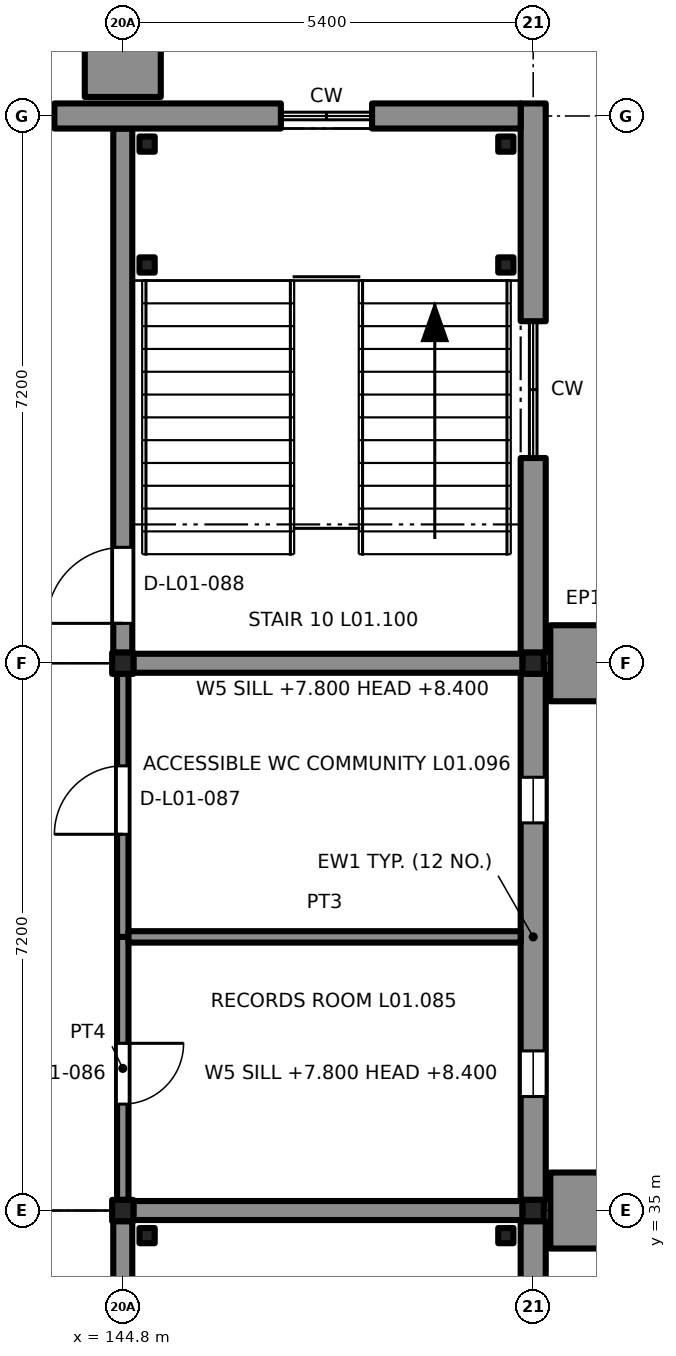
"""IFC4 building model, lengths in metres.
Left out: names, types, materials, properties, quantities, classifications, styles, units other than length and angle.
Written with IfcOpenShell. Run it as: python <this file> out.ifc"""

import sys

from ifc_helpers import new_model, si_unit, direction, frame, frame_2d, origin, origin_2d, place, context, subcontext, project, spatial, rectangle, extrude, element, fill, save


model = new_model("IFC4")
c1 = context("Model", 3, precision=1e-05, world=origin(), true_north=direction((0.0, 1.0)))
c2 = subcontext(c1, "Body", "Model", "MODEL_VIEW")
j1 = project(units=[si_unit("LENGTHUNIT", "METRE"), si_unit("PLANEANGLEUNIT", "RADIAN")], contexts=[c1])
p1 = place(None, origin())
s1 = spatial("IfcSite", under=j1, at=p1, CompositionType="ELEMENT")
p2 = place(p1, origin())
s2 = spatial("IfcBuilding", under=s1, at=p2, CompositionType="ELEMENT")
p3 = place(p2, frame((0.0, 0.0, 6.3)))
s3 = spatial("IfcBuildingStorey", under=s2, at=p3, CompositionType="ELEMENT", Elevation=6.3)
for number, where, z_axis, x_axis in (
    (1, (144.8, 35.0, 0.0), (0.0, 0.0, 1.0), (1.0, 0.0, 0.0)),
    (2, (150.2, 35.0, 0.0), (0.0, 0.0, 1.0), (1.0, 0.0, 0.0)),
    (3, (144.8, 42.2, 0.0), (0.0, 0.0, 1.0), (1.0, 0.0, 0.0)),
    (4, (150.2, 42.2, 0.0), (0.0, 0.0, 1.0), (1.0, 0.0, 0.0)),
):
    element("IfcColumn", number, at=place(p3, frame(where, z_axis=z_axis, x_axis=x_axis)), inside=s3, PredefinedType="COLUMN", context=c2, shape_type="SweptSolid", body=[
        extrude(rectangle(XDim=0.28, YDim=0.28, at=origin_2d()), origin(), (0.0, 0.0, 1.0), 3.9),
    ])
p4 = place(p3, frame((144.8, 27.94, 0.0), z_axis=(0.0, 0.0, 1.0), x_axis=(0.0, 1.0, 0.0)))
e5 = element("IfcWall", 5, at=p4, inside=s3, PredefinedType="SHEAR", context=c2, shape_type="SweptSolid", body=[
    extrude(rectangle(XDim=6.92, YDim=0.25, at=frame_2d((3.46, 0.0))), origin(), (0.0, 0.0, 1.0), 3.65),
])
p5 = place(p4, frame((0.335, 0.0, 0.0)))
e6 = element("IfcOpeningElement", 6, at=p5, cuts=e5, PredefinedType="OPENING", context=c2, shape_type="SweptSolid", body=[
    extrude(rectangle(XDim=1.0, YDim=2.1, at=frame_2d((0.5, 1.05))), frame((0.0, 0.135, 0.0), z_axis=(0.0, -1.0, 0.0), x_axis=(1.0, 0.0, 0.0)), (0.0, 0.0, 1.0), 0.27),
])
p6 = place(p3, frame((144.94, 35.0, 0.0), z_axis=(0.0, 0.0, 1.0), x_axis=(1.0, 0.0, 0.0)))
e7 = element("IfcWall", 7, at=p6, inside=s3, PredefinedType="SHEAR", context=c2, shape_type="SweptSolid", body=[
    extrude(rectangle(XDim=5.12, YDim=0.25, at=frame_2d((2.56, 0.0))), origin(), (0.0, 0.0, 1.0), 3.65),
])
for number, where, z_axis, x_axis in (
    (8, (145.12, 34.67, 0.0), (0.0, 0.0, 1.0), (1.0, 0.0, 0.0)),
    (9, (149.84, 34.67, 0.0), (0.0, 0.0, 1.0), (1.0, 0.0, 0.0)),
):
    element("IfcColumn", number, at=place(p3, frame(where, z_axis=z_axis, x_axis=x_axis)), inside=s3, PredefinedType="COLUMN", context=c2, shape_type="SweptSolid", body=[
        extrude(rectangle(XDim=0.2, YDim=0.2, at=origin_2d()), origin(), (0.0, 0.0, 1.0), 1.75),
    ])
p7 = place(p3, frame((144.8, 42.34, 0.0), z_axis=(0.0, 0.0, 1.0), x_axis=(0.0, 1.0, 0.0)))
e10 = element("IfcWall", 10, at=p7, inside=s3, PredefinedType="SHEAR", context=c2, shape_type="SweptSolid", body=[
    extrude(rectangle(XDim=6.895, YDim=0.25, at=frame_2d((3.448, 0.0))), origin(), (0.0, 0.0, 1.0), 3.65),
])
p8 = place(p7, frame((0.385, 0.0, 0.0)))
e11 = element("IfcOpeningElement", 11, at=p8, cuts=e10, PredefinedType="OPENING", context=c2, shape_type="SweptSolid", body=[
    extrude(rectangle(XDim=1.0, YDim=2.1, at=frame_2d((0.5, 1.05))), frame((0.0, 0.135, 0.0), z_axis=(0.0, -1.0, 0.0), x_axis=(1.0, 0.0, 0.0)), (0.0, 0.0, 1.0), 0.27),
])
p9 = place(p3, frame((144.94, 42.2, 0.0), z_axis=(0.0, 0.0, 1.0), x_axis=(1.0, 0.0, 0.0)))
e12 = element("IfcWall", 12, at=p9, inside=s3, PredefinedType="SHEAR", context=c2, shape_type="SweptSolid", body=[
    extrude(rectangle(XDim=5.12, YDim=0.25, at=frame_2d((2.56, 0.0))), origin(), (0.0, 0.0, 1.0), 3.65),
])
for number, where, z_axis, x_axis in (
    (13, (145.12, 49.03, 0.0), (0.0, 0.0, 1.0), (1.0, 0.0, 0.0)),
    (14, (149.84, 49.03, 0.0), (0.0, 0.0, 1.0), (1.0, 0.0, 0.0)),
    (15, (145.12, 47.44, 0.0), (0.0, 0.0, 1.0), (1.0, 0.0, 0.0)),
    (16, (149.84, 47.44, 0.0), (0.0, 0.0, 1.0), (1.0, 0.0, 0.0)),
):
    element("IfcColumn", number, at=place(p3, frame(where, z_axis=z_axis, x_axis=x_axis)), inside=s3, PredefinedType="COLUMN", context=c2, shape_type="SweptSolid", body=[
        extrude(rectangle(XDim=0.2, YDim=0.2, at=origin_2d()), origin(), (0.0, 0.0, 1.0), 1.75),
    ])
p10 = place(p3, frame((150.2, 34.86, 0.0), z_axis=(0.0, 0.0, 1.0), x_axis=(0.0, -1.0, 0.0)))
e17 = element("IfcWall", 17, at=p10, inside=s3, PredefinedType="SOLIDWALL", context=c2, shape_type="SweptSolid", body=[
    extrude(rectangle(XDim=2.76, YDim=0.33, at=frame_2d((1.38, 0.0))), origin(), (0.0, 0.0, 1.0), 3.22),
])
p11 = place(p3, frame((150.2, 42.06, 0.0), z_axis=(0.0, 0.0, 1.0), x_axis=(0.0, -1.0, 0.0)))
e18 = element("IfcWall", 18, at=p11, inside=s3, PredefinedType="SOLIDWALL", context=c2, shape_type="SweptSolid", body=[
    extrude(rectangle(XDim=6.92, YDim=0.33, at=frame_2d((3.46, 0.0))), origin(), (0.0, 0.0, 1.0), 3.22),
])
p12 = place(p11, frame((4.96, 0.0, 1.5)))
e19 = element("IfcOpeningElement", 19, at=p12, cuts=e18, PredefinedType="OPENING", context=c2, shape_type="SweptSolid", body=[
    extrude(rectangle(XDim=0.6, YDim=0.6, at=frame_2d((0.3, 0.3))), frame((0.0, 0.175, 0.0), z_axis=(0.0, -1.0, 0.0), x_axis=(1.0, 0.0, 0.0)), (0.0, 0.0, 1.0), 0.35),
])
p13 = place(p11, frame((1.36, 0.0, 1.5)))
e20 = element("IfcOpeningElement", 20, at=p13, cuts=e18, PredefinedType="OPENING", context=c2, shape_type="SweptSolid", body=[
    extrude(rectangle(XDim=0.6, YDim=0.6, at=frame_2d((0.3, 0.3))), frame((0.0, 0.175, 0.0), z_axis=(0.0, -1.0, 0.0), x_axis=(1.0, 0.0, 0.0)), (0.0, 0.0, 1.0), 0.35),
])
p14 = place(p3, frame((150.2, 44.9, 0.0), z_axis=(0.0, 0.0, 1.0), x_axis=(0.0, -1.0, 0.0)))
e21 = element("IfcWall", 21, at=p14, inside=s3, PredefinedType="SOLIDWALL", context=c2, shape_type="SweptSolid", body=[
    extrude(rectangle(XDim=2.56, YDim=0.33, at=frame_2d((1.28, 0.0))), origin(), (0.0, 0.0, 1.0), 3.22),
])
p15 = place(p3, frame((150.2, 49.565, 0.0), z_axis=(0.0, 0.0, 1.0), x_axis=(0.0, -1.0, 0.0)))
e22 = element("IfcWall", 22, at=p15, inside=s3, PredefinedType="SOLIDWALL", context=c2, shape_type="SweptSolid", body=[
    extrude(rectangle(XDim=2.865, YDim=0.33, at=frame_2d((1.433, 0.0))), origin(), (0.0, 0.0, 1.0), 3.22),
])
for number, where, z_axis, x_axis in (
    (23, (150.8, 35.5, 0.0), (0.0, 0.0, 1.0), (0.0, -1.0, 0.0)),
    (24, (150.8, 42.7, 0.0), (0.0, 0.0, 1.0), (0.0, -1.0, 0.0)),
):
    element("IfcWall", number, at=place(p3, frame(where, z_axis=z_axis, x_axis=x_axis)), inside=s3, PredefinedType="SOLIDWALL", context=c2, shape_type="SweptSolid", body=[
        extrude(rectangle(XDim=1.0, YDim=0.75, at=frame_2d((0.5, 0.0))), origin(), (0.0, 0.0, 1.0), 3.9),
    ])
p16 = place(p3, frame((143.9, 49.4, 0.0), z_axis=(0.0, 0.0, 1.0), x_axis=(1.0, 0.0, 0.0)))
e25 = element("IfcWall", 25, at=p16, inside=s3, PredefinedType="SOLIDWALL", context=c2, shape_type="SweptSolid", body=[
    extrude(rectangle(XDim=2.98, YDim=0.33, at=frame_2d((1.49, 0.0))), origin(), (0.0, 0.0, 1.0), 3.2),
])
p17 = place(p3, frame((148.08, 49.4, 0.0), z_axis=(0.0, 0.0, 1.0), x_axis=(1.0, 0.0, 0.0)))
e26 = element("IfcWall", 26, at=p17, inside=s3, PredefinedType="SOLIDWALL", context=c2, shape_type="SweptSolid", body=[
    extrude(rectangle(XDim=1.955, YDim=0.33, at=frame_2d((0.978, 0.0))), origin(), (0.0, 0.0, 1.0), 3.2),
])
p18 = place(p3, frame((144.3, 50.025, 0.0), z_axis=(0.0, 0.0, 1.0), x_axis=(1.0, 0.0, 0.0)))
e27 = element("IfcWall", 27, at=p18, inside=s3, PredefinedType="SOLIDWALL", context=c2, shape_type="SweptSolid", body=[
    extrude(rectangle(XDim=1.0, YDim=0.75, at=frame_2d((0.5, 0.0))), origin(), (0.0, 0.0, 1.0), 3.9),
])
p19 = place(p3, frame((144.8, 38.6, 0.0), z_axis=(0.0, 0.0, 1.0), x_axis=(0.0, -1.0, 0.0)))
e28 = element("IfcWall", 28, at=p19, inside=s3, PredefinedType="PARTITIONING", context=c2, shape_type="SweptSolid", body=[
    extrude(rectangle(XDim=3.46, YDim=0.15, at=frame_2d((1.73, 0.0))), origin(), (0.0, 0.0, 1.0), 3.22),
])
p20 = place(p19, frame((1.4, 0.0, 0.0)))
e29 = element("IfcOpeningElement", 29, at=p20, cuts=e28, PredefinedType="OPENING", context=c2, shape_type="SweptSolid", body=[
    extrude(rectangle(XDim=0.8, YDim=2.1, at=frame_2d((0.4, 1.05))), frame((0.0, 0.085, 0.0), z_axis=(0.0, -1.0, 0.0), x_axis=(1.0, 0.0, 0.0)), (0.0, 0.0, 1.0), 0.17),
])
p21 = place(p3, frame((144.8, 38.6, 0.0), z_axis=(0.0, 0.0, 1.0), x_axis=(0.0, 1.0, 0.0)))
e30 = element("IfcWall", 30, at=p21, inside=s3, PredefinedType="PARTITIONING", context=c2, shape_type="SweptSolid", body=[
    extrude(rectangle(XDim=3.46, YDim=0.15, at=frame_2d((1.73, 0.0))), origin(), (0.0, 0.0, 1.0), 3.22),
])
p22 = place(p21, frame((1.35, 0.0, 0.0)))
e31 = element("IfcOpeningElement", 31, at=p22, cuts=e30, PredefinedType="OPENING", context=c2, shape_type="SweptSolid", body=[
    extrude(rectangle(XDim=0.9, YDim=2.1, at=frame_2d((0.45, 1.05))), frame((0.0, 0.085, 0.0), z_axis=(0.0, -1.0, 0.0), x_axis=(1.0, 0.0, 0.0)), (0.0, 0.0, 1.0), 0.17),
])
p23 = place(p3, frame((150.035, 38.6, 0.0), z_axis=(0.0, 0.0, 1.0), x_axis=(-1.0, 0.0, 0.0)))
e32 = element("IfcWall", 32, at=p23, inside=s3, PredefinedType="PARTITIONING", context=c2, shape_type="SweptSolid", body=[
    extrude(rectangle(XDim=5.16, YDim=0.15, at=frame_2d((2.58, 0.0))), origin(), (0.0, 0.0, 1.0), 3.38),
])
p24 = place(p8, origin())
e33 = element("IfcDoor", 33, at=p24, inside=s3, OperationType="SINGLE_SWING_RIGHT", PredefinedType="DOOR", context=c2, shape_type="SweptSolid", body=[
    extrude(rectangle(XDim=1.0, YDim=2.1, at=frame_2d((0.5, 1.05))), frame((0.0, 0.025, 0.0), z_axis=(0.0, -1.0, 0.0), x_axis=(1.0, 0.0, 0.0)), (0.0, 0.0, 1.0), 0.05),
])
fill(e11, e33)
p25 = place(p12, origin())
e34 = element("IfcWindow", 34, at=p25, inside=s3, PartitioningType="SINGLE_PANEL", PredefinedType="WINDOW", context=c2, shape_type="SweptSolid", body=[
    extrude(rectangle(XDim=0.6, YDim=0.6, at=frame_2d((0.3, 0.3))), frame((0.0, -0.03, 0.0), z_axis=(0.0, -1.0, 0.0), x_axis=(1.0, 0.0, 0.0)), (0.0, 0.0, 1.0), 0.06),
])
fill(e19, e34)
p26 = place(p13, origin())
e35 = element("IfcWindow", 35, at=p26, inside=s3, PartitioningType="SINGLE_PANEL", PredefinedType="WINDOW", context=c2, shape_type="SweptSolid", body=[
    extrude(rectangle(XDim=0.6, YDim=0.6, at=frame_2d((0.3, 0.3))), frame((0.0, -0.03, 0.0), z_axis=(0.0, -1.0, 0.0), x_axis=(1.0, 0.0, 0.0)), (0.0, 0.0, 1.0), 0.06),
])
fill(e20, e35)
p27 = place(p20, origin())
e36 = element("IfcDoor", 36, at=p27, inside=s3, OperationType="SINGLE_SWING_RIGHT", PredefinedType="DOOR", context=c2, shape_type="SweptSolid", body=[
    extrude(rectangle(XDim=0.8, YDim=2.1, at=frame_2d((0.4, 1.05))), frame((0.0, 0.025, 0.0), z_axis=(0.0, -1.0, 0.0), x_axis=(1.0, 0.0, 0.0)), (0.0, 0.0, 1.0), 0.05),
])
fill(e29, e36)
p28 = place(p22, origin())
e37 = element("IfcDoor", 37, at=p28, inside=s3, OperationType="SINGLE_SWING_RIGHT", PredefinedType="DOOR", context=c2, shape_type="SweptSolid", body=[
    extrude(rectangle(XDim=0.9, YDim=2.1, at=frame_2d((0.45, 1.05))), frame((0.0, 0.025, 0.0), z_axis=(0.0, -1.0, 0.0), x_axis=(1.0, 0.0, 0.0)), (0.0, 0.0, 1.0), 0.05),
])
fill(e31, e37)
save(model, sys.argv[1])
